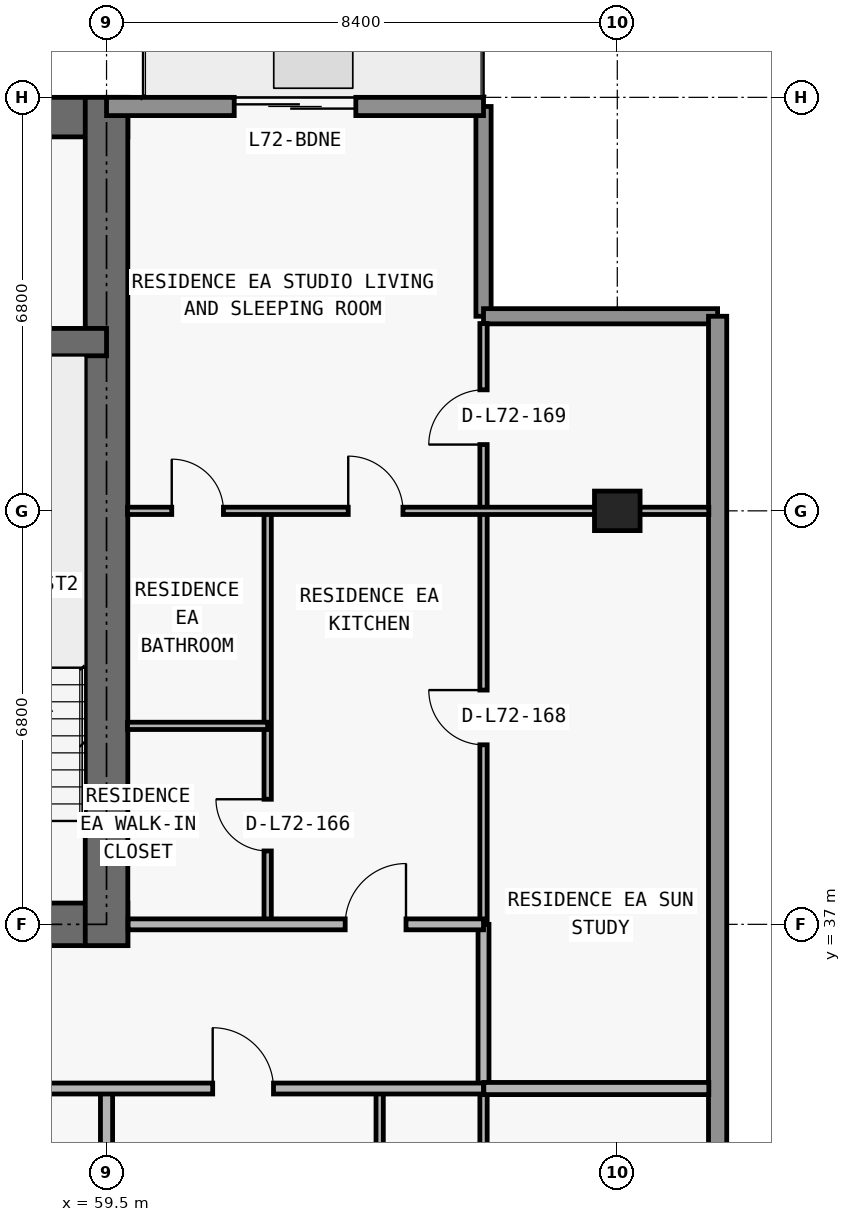
"""IFC4 building model, lengths in metres.
Left out: names, types, materials, properties, quantities, classifications, styles, units other than length and angle.
Written with IfcOpenShell. Run it as: python <this file> out.ifc"""

import sys

from ifc_helpers import new_model, si_unit, direction, frame, frame_2d, origin, origin_2d, place, context, subcontext, project, spatial, rectangle, extrude, element, fill, save


model = new_model("IFC4")
c1 = context("Model", 3, precision=1e-05, world=origin(), true_north=direction((0.0, 1.0)))
c2 = subcontext(c1, "Body", "Model", "MODEL_VIEW")
j1 = project(units=[si_unit("LENGTHUNIT", "METRE"), si_unit("PLANEANGLEUNIT", "RADIAN")], contexts=[c1])
p1 = place(None, origin())
s1 = spatial("IfcSite", under=j1, at=p1, CompositionType="ELEMENT")
p2 = place(p1, origin())
s2 = spatial("IfcBuilding", under=s1, at=p2, CompositionType="ELEMENT")
p3 = place(p2, frame((0.0, 0.0, 256.2)))
s3 = spatial("IfcBuildingStorey", under=s2, at=p3, CompositionType="ELEMENT", Elevation=256.2)
p4 = place(p3, frame((67.9, 43.8, 0.0), z_axis=(0.0, 0.0, 1.0), x_axis=(1.0, 0.0, 0.0)))
e1 = element("IfcColumn", 1, at=p4, inside=s3, PredefinedType="COLUMN", context=c2, shape_type="SweptSolid", body=[
    extrude(rectangle(XDim=0.75, YDim=0.65, at=origin_2d()), origin(), (0.0, 0.0, 1.0), 3.05),
])
p5 = place(p3, frame((17.95, 37.0, 0.0), z_axis=(0.0, 0.0, 1.0), x_axis=(1.0, 0.0, 0.0)))
e2 = element("IfcWall", 2, at=p5, inside=s3, PredefinedType="SHEAR", context=c2, shape_type="SweptSolid", body=[
    extrude(rectangle(XDim=41.9, YDim=0.7, at=frame_2d((20.95, 0.0))), origin(), (0.0, 0.0, 1.0), 3.05),
])
p6 = place(p5, frame((14.35, 0.0, 0.0)))
e3 = element("IfcOpeningElement", 3, at=p6, cuts=e2, PredefinedType="OPENING", context=c2, shape_type="SweptSolid", body=[
    extrude(rectangle(XDim=1.1, YDim=2.15, at=frame_2d((0.55, 1.075))), frame((0.0, 0.36, 0.0), z_axis=(0.0, -1.0, 0.0), x_axis=(1.0, 0.0, 0.0)), (0.0, 0.0, 1.0), 0.72),
])
p7 = place(p5, frame((6.2, 0.0, 0.0)))
e4 = element("IfcOpeningElement", 4, at=p7, cuts=e2, PredefinedType="OPENING", context=c2, shape_type="SweptSolid", body=[
    extrude(rectangle(XDim=1.05, YDim=2.15, at=frame_2d((0.525, 1.075))), frame((0.0, 0.36, 0.0), z_axis=(0.0, -1.0, 0.0), x_axis=(1.0, 0.0, 0.0)), (0.0, 0.0, 1.0), 0.72),
])
p8 = place(p5, frame((34.7, 0.0, 0.0)))
e5 = element("IfcOpeningElement", 5, at=p8, cuts=e2, PredefinedType="OPENING", context=c2, shape_type="SweptSolid", body=[
    extrude(rectangle(XDim=1.05, YDim=2.15, at=frame_2d((0.525, 1.075))), frame((0.0, 0.36, 0.0), z_axis=(0.0, -1.0, 0.0), x_axis=(1.0, 0.0, 0.0)), (0.0, 0.0, 1.0), 0.72),
])
p9 = place(p5, frame((10.812, 0.0, 0.0)))
e6 = element("IfcOpeningElement", 6, at=p9, cuts=e2, PredefinedType="OPENING", context=c2, shape_type="SweptSolid", body=[
    extrude(rectangle(XDim=1.05, YDim=2.15, at=frame_2d((0.525, 1.075))), frame((0.0, 0.36, 0.0), z_axis=(0.0, -1.0, 0.0), x_axis=(1.0, 0.0, 0.0)), (0.0, 0.0, 1.0), 0.72),
])
p10 = place(p5, frame((24.05, 0.0, 0.0)))
e7 = element("IfcOpeningElement", 7, at=p10, cuts=e2, PredefinedType="OPENING", context=c2, shape_type="SweptSolid", body=[
    extrude(rectangle(XDim=1.05, YDim=2.15, at=frame_2d((0.525, 1.075))), frame((0.0, 0.36, 0.0), z_axis=(0.0, -1.0, 0.0), x_axis=(1.0, 0.0, 0.0)), (0.0, 0.0, 1.0), 0.72),
])
p11 = place(p3, frame((17.95, 50.275, 0.0), z_axis=(0.0, 0.0, 1.0), x_axis=(1.0, 0.0, 0.0)))
e8 = element("IfcWall", 8, at=p11, inside=s3, PredefinedType="SHEAR", context=c2, shape_type="SweptSolid", body=[
    extrude(rectangle(XDim=41.9, YDim=0.65, at=frame_2d((20.95, 0.0))), origin(), (0.0, 0.0, 1.0), 3.05),
])
p12 = place(p3, frame((59.5, 36.65, 0.0), z_axis=(0.0, 0.0, 1.0), x_axis=(0.0, 1.0, 0.0)))
e9 = element("IfcWall", 9, at=p12, inside=s3, PredefinedType="SHEAR", context=c2, shape_type="SweptSolid", body=[
    extrude(rectangle(XDim=13.95, YDim=0.7, at=frame_2d((6.975, 0.0))), origin(), (0.0, 0.0, 1.0), 3.05),
])
p13 = place(p3, frame((18.3, 46.575, 0.0), z_axis=(0.0, 0.0, 1.0), x_axis=(1.0, 0.0, 0.0)))
e10 = element("IfcWall", 10, at=p13, inside=s3, PredefinedType="SHEAR", context=c2, shape_type="SweptSolid", body=[
    extrude(rectangle(XDim=41.2, YDim=0.45, at=frame_2d((20.6, 0.0))), origin(), (0.0, 0.0, 1.0), 3.05),
])
p14 = place(p13, frame((7.575, 0.0, 0.0)))
e11 = element("IfcOpeningElement", 11, at=p14, cuts=e10, PredefinedType="OPENING", context=c2, shape_type="SweptSolid", body=[
    extrude(rectangle(XDim=1.05, YDim=2.15, at=frame_2d((0.525, 1.075))), frame((0.0, 0.235, 0.0), z_axis=(0.0, -1.0, 0.0), x_axis=(1.0, 0.0, 0.0)), (0.0, 0.0, 1.0), 0.47),
])
p15 = place(p13, frame((32.625, 0.0, 0.0)))
e12 = element("IfcOpeningElement", 12, at=p15, cuts=e10, PredefinedType="OPENING", context=c2, shape_type="SweptSolid", body=[
    extrude(rectangle(XDim=1.05, YDim=2.15, at=frame_2d((0.525, 1.075))), frame((0.0, 0.235, 0.0), z_axis=(0.0, -1.0, 0.0), x_axis=(1.0, 0.0, 0.0)), (0.0, 0.0, 1.0), 0.47),
])
p16 = place(p3, frame((65.7, 50.45, 0.0), z_axis=(0.0, 0.0, 1.0), x_axis=(0.0, -1.0, 0.0)))
e13 = element("IfcWall", 13, at=p16, inside=s3, PredefinedType="ELEMENTEDWALL", context=c2, shape_type="SweptSolid", body=[
    extrude(rectangle(XDim=3.45, YDim=0.25, at=frame_2d((1.725, 0.0))), origin(), (0.0, 0.0, 1.0), 3.05),
])
p17 = place(p3, frame((65.7, 47.0, 0.0), z_axis=(0.0, 0.0, 1.0), x_axis=(1.0, 0.0, 0.0)))
e14 = element("IfcWall", 14, at=p17, inside=s3, PredefinedType="ELEMENTEDWALL", context=c2, shape_type="SweptSolid", body=[
    extrude(rectangle(XDim=3.85, YDim=0.25, at=frame_2d((1.925, 0.0))), origin(), (0.0, 0.0, 1.0), 3.05),
])
p18 = place(p3, frame((69.55, 47.0, 0.0), z_axis=(0.0, 0.0, 1.0), x_axis=(0.0, -1.0, 0.0)))
e15 = element("IfcWall", 15, at=p18, inside=s3, PredefinedType="STANDARD", context=c2, shape_type="SweptSolid", body=[
    extrude(rectangle(XDim=16.85, YDim=0.3, at=frame_2d((8.425, 0.0))), origin(), (0.0, 0.0, 1.0), 3.05),
])
p19 = place(p3, frame((59.5, 50.45, 0.0), z_axis=(0.0, 0.0, 1.0), x_axis=(1.0, 0.0, 0.0)))
e16 = element("IfcWall", 16, at=p19, inside=s3, PredefinedType="STANDARD", context=c2, shape_type="SweptSolid", body=[
    extrude(rectangle(XDim=6.2, YDim=0.3, at=frame_2d((3.1, 0.0))), origin(), (0.0, 0.0, 1.0), 3.05),
])
p20 = place(p19, frame((2.1, 0.0, 0.0)))
e17 = element("IfcOpeningElement", 17, at=p20, cuts=e16, PredefinedType="OPENING", context=c2, shape_type="SweptSolid", body=[
    extrude(rectangle(XDim=2.0, YDim=2.3, at=frame_2d((1.0, 1.15))), frame((0.0, 0.16, 0.0), z_axis=(0.0, -1.0, 0.0), x_axis=(1.0, 0.0, 0.0)), (0.0, 0.0, 1.0), 0.32),
])
p21 = place(p3, frame((59.5, 28.68, 0.0), z_axis=(0.0, 0.0, 1.0), x_axis=(0.0, 1.0, 0.0)))
e18 = element("IfcWall", 18, at=p21, inside=s3, PredefinedType="PARTITIONING", context=c2, shape_type="SweptSolid", body=[
    extrude(rectangle(XDim=5.62, YDim=0.2, at=frame_2d((2.81, 0.0))), origin(), (0.0, 0.0, 1.0), 2.263),
])
p22 = place(p3, frame((62.15, 37.0, 0.0), z_axis=(0.0, 0.0, 1.0), x_axis=(0.0, 1.0, 0.0)))
e19 = element("IfcWall", 19, at=p22, inside=s3, PredefinedType="PARTITIONING", context=c2, shape_type="SweptSolid", body=[
    extrude(rectangle(XDim=6.8, YDim=0.12, at=frame_2d((3.4, 0.0))), origin(), (0.0, 0.0, 1.0), 2.679),
])
p23 = place(p22, frame((1.207, 0.0, 0.0)))
e20 = element("IfcOpeningElement", 20, at=p23, cuts=e19, PredefinedType="OPENING", context=c2, shape_type="SweptSolid", body=[
    extrude(rectangle(XDim=0.85, YDim=2.1, at=frame_2d((0.425, 1.05))), frame((0.0, 0.07, 0.0), z_axis=(0.0, -1.0, 0.0), x_axis=(1.0, 0.0, 0.0)), (0.0, 0.0, 1.0), 0.14),
])
p24 = place(p3, frame((63.992, 28.68, 0.0), z_axis=(0.0, 0.0, 1.0), x_axis=(0.0, 1.0, 0.0)))
e21 = element("IfcWall", 21, at=p24, inside=s3, PredefinedType="PARTITIONING", context=c2, shape_type="SweptSolid", body=[
    extrude(rectangle(XDim=5.62, YDim=0.12, at=frame_2d((2.81, 0.0))), origin(), (0.0, 0.0, 1.0), 3.05),
])
p25 = place(p24, frame((2.385, 0.0, 0.0)))
e22 = element("IfcOpeningElement", 22, at=p25, cuts=e21, PredefinedType="OPENING", context=c2, shape_type="SweptSolid", body=[
    extrude(rectangle(XDim=0.85, YDim=2.1, at=frame_2d((0.425, 1.05))), frame((0.0, 0.07, 0.0), z_axis=(0.0, -1.0, 0.0), x_axis=(1.0, 0.0, 0.0)), (0.0, 0.0, 1.0), 0.14),
])
p26 = place(p3, frame((65.7, 28.68, 0.0), z_axis=(0.0, 0.0, 1.0), x_axis=(0.0, 1.0, 0.0)))
e23 = element("IfcWall", 23, at=p26, inside=s3, PredefinedType="PARTITIONING", context=c2, shape_type="SweptSolid", body=[
    extrude(rectangle(XDim=5.62, YDim=0.12, at=frame_2d((2.81, 0.0))), origin(), (0.0, 0.0, 1.0), 3.05),
])
p27 = place(p3, frame((65.7, 34.305, 0.0), z_axis=(0.0, 0.0, 1.0), x_axis=(0.0, 1.0, 0.0)))
e24 = element("IfcWall", 24, at=p27, inside=s3, PredefinedType="PARTITIONING", context=c2, shape_type="SweptSolid", body=[
    extrude(rectangle(XDim=2.695, YDim=0.18, at=frame_2d((1.348, 0.0))), origin(), (0.0, 0.0, 1.0), 3.05),
])
p28 = place(p3, frame((65.7, 37.005, 0.0), z_axis=(0.0, 0.0, 1.0), x_axis=(0.0, 1.0, 0.0)))
e25 = element("IfcWall", 25, at=p28, inside=s3, PredefinedType="PARTITIONING", context=c2, shape_type="SweptSolid", body=[
    extrude(rectangle(XDim=9.875, YDim=0.12, at=frame_2d((4.938, 0.0))), origin(), (0.0, 0.0, 1.0), 3.05),
])
p29 = place(p28, frame((2.948, 0.0, 0.0)))
e26 = element("IfcOpeningElement", 26, at=p29, cuts=e25, PredefinedType="OPENING", context=c2, shape_type="SweptSolid", body=[
    extrude(rectangle(XDim=0.9, YDim=2.15, at=frame_2d((0.45, 1.075))), frame((0.0, 0.07, 0.0), z_axis=(0.0, -1.0, 0.0), x_axis=(1.0, 0.0, 0.0)), (0.0, 0.0, 1.0), 0.14),
])
p30 = place(p28, frame((7.885, 0.0, 0.0)))
e27 = element("IfcOpeningElement", 27, at=p30, cuts=e25, PredefinedType="OPENING", context=c2, shape_type="SweptSolid", body=[
    extrude(rectangle(XDim=0.9, YDim=2.15, at=frame_2d((0.45, 1.075))), frame((0.0, 0.07, 0.0), z_axis=(0.0, -1.0, 0.0), x_axis=(1.0, 0.0, 0.0)), (0.0, 0.0, 1.0), 0.14),
])
p31 = place(p3, frame((12.105, 34.3, 0.0), z_axis=(0.0, 0.0, 1.0), x_axis=(1.0, 0.0, 0.0)))
e28 = element("IfcWall", 28, at=p31, inside=s3, PredefinedType="PARTITIONING", context=c2, shape_type="SweptSolid", body=[
    extrude(rectangle(XDim=53.595, YDim=0.18, at=frame_2d((26.797, 0.0))), origin(), (0.0, 0.0, 1.0), 3.05),
])
p32 = place(p31, frame((1.661, 0.0, 0.0)))
e29 = element("IfcOpeningElement", 29, at=p32, cuts=e28, PredefinedType="OPENING", context=c2, shape_type="SweptSolid", body=[
    extrude(rectangle(XDim=1.0, YDim=2.2, at=frame_2d((0.5, 1.1))), frame((0.0, 0.1, 0.0), z_axis=(0.0, -1.0, 0.0), x_axis=(1.0, 0.0, 0.0)), (0.0, 0.0, 1.0), 0.2),
])
p33 = place(p31, frame((17.438, 0.0, 0.0)))
e30 = element("IfcOpeningElement", 30, at=p33, cuts=e28, PredefinedType="OPENING", context=c2, shape_type="SweptSolid", body=[
    extrude(rectangle(XDim=1.0, YDim=2.2, at=frame_2d((0.5, 1.1))), frame((0.0, 0.1, 0.0), z_axis=(0.0, -1.0, 0.0), x_axis=(1.0, 0.0, 0.0)), (0.0, 0.0, 1.0), 0.2),
])
p34 = place(p31, frame((41.727, 0.0, 0.0)))
e31 = element("IfcOpeningElement", 31, at=p34, cuts=e28, PredefinedType="OPENING", context=c2, shape_type="SweptSolid", body=[
    extrude(rectangle(XDim=1.0, YDim=2.2, at=frame_2d((0.5, 1.1))), frame((0.0, 0.1, 0.0), z_axis=(0.0, -1.0, 0.0), x_axis=(1.0, 0.0, 0.0)), (0.0, 0.0, 1.0), 0.2),
])
p35 = place(p31, frame((49.141, 0.0, 0.0)))
e32 = element("IfcOpeningElement", 32, at=p35, cuts=e28, PredefinedType="OPENING", context=c2, shape_type="SweptSolid", body=[
    extrude(rectangle(XDim=1.0, YDim=2.2, at=frame_2d((0.5, 1.1))), frame((0.0, 0.1, 0.0), z_axis=(0.0, -1.0, 0.0), x_axis=(1.0, 0.0, 0.0)), (0.0, 0.0, 1.0), 0.2),
])
p36 = place(p3, frame((65.705, 34.3, 0.0), z_axis=(0.0, 0.0, 1.0), x_axis=(1.0, 0.0, 0.0)))
e33 = element("IfcWall", 33, at=p36, inside=s3, PredefinedType="PARTITIONING", context=c2, shape_type="SweptSolid", body=[
    extrude(rectangle(XDim=3.7, YDim=0.2, at=frame_2d((1.85, 0.0))), origin(), (0.0, 0.0, 1.0), 3.05),
])
p37 = place(p3, frame((59.855, 37.0, 0.0), z_axis=(0.0, 0.0, 1.0), x_axis=(1.0, 0.0, 0.0)))
e34 = element("IfcWall", 34, at=p37, inside=s3, PredefinedType="PARTITIONING", context=c2, shape_type="SweptSolid", body=[
    extrude(rectangle(XDim=5.845, YDim=0.18, at=frame_2d((2.922, 0.0))), origin(), (0.0, 0.0, 1.0), 3.05),
])
p38 = place(p37, frame((3.57, 0.0, 0.0)))
e35 = element("IfcOpeningElement", 35, at=p38, cuts=e34, PredefinedType="OPENING", context=c2, shape_type="SweptSolid", body=[
    extrude(rectangle(XDim=1.0, YDim=2.2, at=frame_2d((0.5, 1.1))), frame((0.0, 0.1, 0.0), z_axis=(0.0, -1.0, 0.0), x_axis=(1.0, 0.0, 0.0)), (0.0, 0.0, 1.0), 0.2),
])
p39 = place(p3, frame((59.845, 40.264, 0.0), z_axis=(0.0, 0.0, 1.0), x_axis=(1.0, 0.0, 0.0)))
e36 = element("IfcWall", 36, at=p39, inside=s3, PredefinedType="PARTITIONING", context=c2, shape_type="SweptSolid", body=[
    extrude(rectangle(XDim=2.305, YDim=0.12, at=frame_2d((1.152, 0.0))), origin(), (0.0, 0.0, 1.0), 3.05),
])
p40 = place(p3, frame((59.845, 43.8, 0.0), z_axis=(0.0, 0.0, 1.0), x_axis=(1.0, 0.0, 0.0)))
e37 = element("IfcWall", 37, at=p40, inside=s3, PredefinedType="PARTITIONING", context=c2, shape_type="SweptSolid", body=[
    extrude(rectangle(XDim=9.56, YDim=0.12, at=frame_2d((4.78, 0.0))), origin(), (0.0, 0.0, 1.0), 2.418),
])
p41 = place(p40, frame((3.63, 0.0, 0.0)))
e38 = element("IfcOpeningElement", 38, at=p41, cuts=e37, PredefinedType="OPENING", context=c2, shape_type="SweptSolid", body=[
    extrude(rectangle(XDim=0.9, YDim=2.15, at=frame_2d((0.45, 1.075))), frame((0.0, 0.07, 0.0), z_axis=(0.0, -1.0, 0.0), x_axis=(1.0, 0.0, 0.0)), (0.0, 0.0, 1.0), 0.14),
])
p42 = place(p40, frame((0.728, 0.0, 0.0)))
e39 = element("IfcOpeningElement", 39, at=p42, cuts=e37, PredefinedType="OPENING", context=c2, shape_type="SweptSolid", body=[
    extrude(rectangle(XDim=0.85, YDim=2.1, at=frame_2d((0.425, 1.05))), frame((0.0, 0.07, 0.0), z_axis=(0.0, -1.0, 0.0), x_axis=(1.0, 0.0, 0.0)), (0.0, 0.0, 1.0), 0.14),
])
p43 = place(p20, origin())
e40 = element("IfcDoor", 40, at=p43, inside=s3, OperationType="DOUBLE_DOOR_SLIDING", PredefinedType="DOOR", context=c2, shape_type="SweptSolid", body=[
    extrude(rectangle(XDim=2.0, YDim=2.3, at=frame_2d((1.0, 1.15))), frame((0.0, 0.025, 0.0), z_axis=(0.0, -1.0, 0.0), x_axis=(1.0, 0.0, 0.0)), (0.0, 0.0, 1.0), 0.05),
])
fill(e17, e40)
p44 = place(p35, origin())
e41 = element("IfcDoor", 41, at=p44, inside=s3, OperationType="SINGLE_SWING_LEFT", PredefinedType="DOOR", context=c2, shape_type="SweptSolid", body=[
    extrude(rectangle(XDim=1.0, YDim=2.2, at=frame_2d((0.5, 1.1))), frame((0.0, 0.025, 0.0), z_axis=(0.0, -1.0, 0.0), x_axis=(1.0, 0.0, 0.0)), (0.0, 0.0, 1.0), 0.05),
])
fill(e32, e41)
p45 = place(p38, origin())
e42 = element("IfcDoor", 42, at=p45, inside=s3, OperationType="SINGLE_SWING_RIGHT", PredefinedType="DOOR", context=c2, shape_type="SweptSolid", body=[
    extrude(rectangle(XDim=1.0, YDim=2.2, at=frame_2d((0.5, 1.1))), frame((0.0, 0.025, 0.0), z_axis=(0.0, -1.0, 0.0), x_axis=(1.0, 0.0, 0.0)), (0.0, 0.0, 1.0), 0.05),
])
fill(e35, e42)
p46 = place(p41, origin())
e43 = element("IfcDoor", 43, at=p46, inside=s3, OperationType="SINGLE_SWING_LEFT", PredefinedType="DOOR", context=c2, shape_type="SweptSolid", body=[
    extrude(rectangle(XDim=0.9, YDim=2.15, at=frame_2d((0.45, 1.075))), frame((0.0, 0.025, 0.0), z_axis=(0.0, -1.0, 0.0), x_axis=(1.0, 0.0, 0.0)), (0.0, 0.0, 1.0), 0.05),
])
fill(e38, e43)
p47 = place(p23, origin())
e44 = element("IfcDoor", 44, at=p47, inside=s3, OperationType="SINGLE_SWING_RIGHT", PredefinedType="DOOR", context=c2, shape_type="SweptSolid", body=[
    extrude(rectangle(XDim=0.85, YDim=2.1, at=frame_2d((0.425, 1.05))), frame((0.0, 0.025, 0.0), z_axis=(0.0, -1.0, 0.0), x_axis=(1.0, 0.0, 0.0)), (0.0, 0.0, 1.0), 0.05),
])
fill(e20, e44)
p48 = place(p42, origin())
e45 = element("IfcDoor", 45, at=p48, inside=s3, OperationType="SINGLE_SWING_LEFT", PredefinedType="DOOR", context=c2, shape_type="SweptSolid", body=[
    extrude(rectangle(XDim=0.85, YDim=2.1, at=frame_2d((0.425, 1.05))), frame((0.0, 0.025, 0.0), z_axis=(0.0, -1.0, 0.0), x_axis=(1.0, 0.0, 0.0)), (0.0, 0.0, 1.0), 0.05),
])
fill(e39, e45)
p49 = place(p29, origin())
e46 = element("IfcDoor", 46, at=p49, inside=s3, OperationType="SINGLE_SWING_RIGHT", PredefinedType="DOOR", context=c2, shape_type="SweptSolid", body=[
    extrude(rectangle(XDim=0.9, YDim=2.15, at=frame_2d((0.45, 1.075))), frame((0.0, 0.025, 0.0), z_axis=(0.0, -1.0, 0.0), x_axis=(1.0, 0.0, 0.0)), (0.0, 0.0, 1.0), 0.05),
])
fill(e26, e46)
p50 = place(p30, origin())
e47 = element("IfcDoor", 47, at=p50, inside=s3, OperationType="SINGLE_SWING_LEFT", PredefinedType="DOOR", context=c2, shape_type="SweptSolid", body=[
    extrude(rectangle(XDim=0.9, YDim=2.15, at=frame_2d((0.45, 1.075))), frame((0.0, 0.025, 0.0), z_axis=(0.0, -1.0, 0.0), x_axis=(1.0, 0.0, 0.0)), (0.0, 0.0, 1.0), 0.05),
])
fill(e27, e47)
save(model, sys.argv[1])
